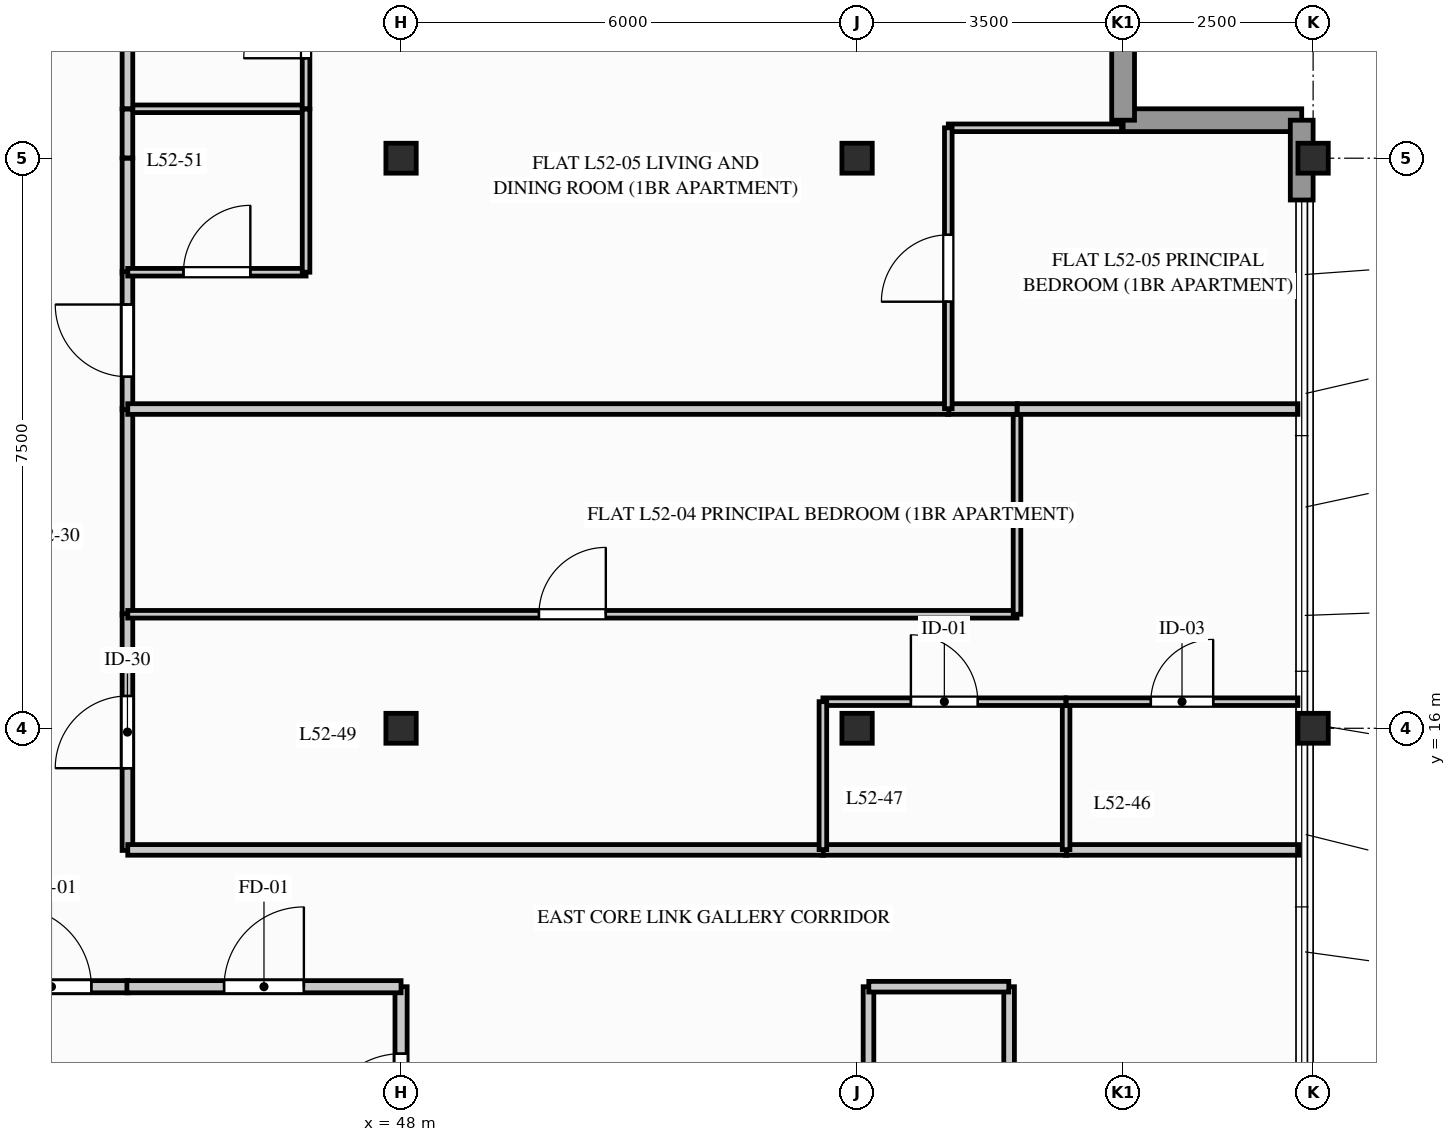
"""IFC4 building model, lengths in metres.
Left out: names, types, materials, properties, quantities, classifications, styles, units other than length and angle.
Written with IfcOpenShell. Run it as: python <this file> out.ifc"""

import sys

from ifc_helpers import new_model, si_unit, direction, frame, frame_2d, origin, origin_2d, place, context, subcontext, project, spatial, rectangle, i_section, extrude, element, fill, save


model = new_model("IFC4")
c1 = context("Model", 3, precision=1e-05, world=origin(), true_north=direction((0.0, 1.0)))
c2 = subcontext(c1, "Body", "Model", "MODEL_VIEW")
j1 = project(units=[si_unit("LENGTHUNIT", "METRE"), si_unit("PLANEANGLEUNIT", "RADIAN")], contexts=[c1])
p1 = place(None, origin())
s1 = spatial("IfcSite", under=j1, at=p1, CompositionType="ELEMENT")
p2 = place(p1, origin())
s2 = spatial("IfcBuilding", under=s1, at=p2, CompositionType="ELEMENT")
p3 = place(p2, frame((0.0, 0.0, 172.8)))
s3 = spatial("IfcBuildingStorey", under=s2, at=p3, CompositionType="ELEMENT", Elevation=172.8)
for number, where, z_axis, x_axis in (
    (1, (48.0, 16.0, 0.0), (0.0, 0.0, 1.0), (1.0, 0.0, 0.0)),
    (2, (48.0, 23.5, 0.0), (0.0, 0.0, 1.0), (1.0, 0.0, 0.0)),
    (3, (54.0, 16.0, 0.0), (0.0, 0.0, 1.0), (1.0, 0.0, 0.0)),
    (4, (54.0, 23.5, 0.0), (0.0, 0.0, 1.0), (1.0, 0.0, 0.0)),
    (5, (60.0, 16.0, 0.0), (0.0, 0.0, 1.0), (1.0, 0.0, 0.0)),
    (6, (60.0, 23.5, 0.0), (0.0, 0.0, 1.0), (1.0, 0.0, 0.0)),
):
    element("IfcColumn", number, at=place(p3, frame(where, z_axis=z_axis, x_axis=x_axis)), inside=s3, PredefinedType="COLUMN", context=c2, shape_type="SweptSolid", body=[
        extrude(i_section(OverallWidth=0.399, OverallDepth=0.394, WebThickness=0.023, FlangeThickness=0.037, FilletRadius=0.015, at=origin_2d()), origin(), (0.0, 0.0, 1.0), 3.1),
    ])
for number, where, z_axis, x_axis in (
    (7, (59.85, 24.0, 0.0), (0.0, 0.0, 1.0), (-1.0, 0.0, 0.0)),
    (8, (57.5, 24.0, 0.0), (0.0, 0.0, 1.0), (0.0, 1.0, 0.0)),
):
    element("IfcWall", number, at=place(p3, frame(where, z_axis=z_axis, x_axis=x_axis)), inside=s3, PredefinedType="STANDARD", context=c2, shape_type="SweptSolid", body=[
        extrude(rectangle(XDim=2.35, YDim=0.3, at=frame_2d((1.175, 0.0))), origin(), (0.0, 0.0, 1.0), 2.89),
    ])
p4 = place(p3, frame((59.85, 22.95, 0.0), z_axis=(0.0, 0.0, 1.0), x_axis=(0.0, 1.0, 0.0)))
e9 = element("IfcWall", 9, at=p4, inside=s3, PredefinedType="STANDARD", context=c2, shape_type="SweptSolid", body=[
    extrude(rectangle(XDim=1.05, YDim=0.3, at=frame_2d((0.525, 0.0))), origin(), (0.0, 0.0, 1.0), 2.89),
])
p5 = place(p3, frame((56.0, 7.189, 0.0), z_axis=(0.0, 0.0, 1.0), x_axis=(0.0, 1.0, 0.0)))
e10 = element("IfcWall", 10, at=p5, inside=s3, PredefinedType="PARTITIONING", context=c2, shape_type="SweptSolid", body=[
    extrude(rectangle(XDim=5.411, YDim=0.14, at=frame_2d((2.706, 0.0))), origin(), (0.0, 0.0, 1.0), 2.253),
])
p6 = place(p5, frame((2.231, 0.0, 0.0)))
e11 = element("IfcOpeningElement", 11, at=p6, cuts=e10, PredefinedType="OPENING", context=c2, shape_type="SweptSolid", body=[
    extrude(rectangle(XDim=0.95, YDim=2.05, at=frame_2d((0.475, 1.025))), frame((0.0, 0.08, 0.0), z_axis=(0.0, -1.0, 0.0), x_axis=(1.0, 0.0, 0.0)), (0.0, 0.0, 1.0), 0.16),
])
p7 = place(p3, frame((48.0, 9.789, 0.0), z_axis=(0.0, 0.0, 1.0), x_axis=(0.0, 1.0, 0.0)))
e12 = element("IfcWall", 12, at=p7, inside=s3, PredefinedType="PARTITIONING", context=c2, shape_type="SweptSolid", body=[
    extrude(rectangle(XDim=2.811, YDim=0.16, at=frame_2d((1.406, 0.0))), origin(), (0.0, 0.0, 1.0), 2.253),
])
p8 = place(p7, frame((0.881, 0.0, 0.0)))
e13 = element("IfcOpeningElement", 13, at=p8, cuts=e12, PredefinedType="OPENING", context=c2, shape_type="SweptSolid", body=[
    extrude(rectangle(XDim=1.05, YDim=2.06, at=frame_2d((0.525, 1.03))), frame((0.0, 0.09, 0.0), z_axis=(0.0, -1.0, 0.0), x_axis=(1.0, 0.0, 0.0)), (0.0, 0.0, 1.0), 0.18),
])
p9 = place(p3, frame((42.389, 12.6, 0.0), z_axis=(0.0, 0.0, 1.0), x_axis=(1.0, 0.0, 0.0)))
e14 = element("IfcWall", 14, at=p9, inside=s3, PredefinedType="PARTITIONING", context=c2, shape_type="SweptSolid", body=[
    extrude(rectangle(XDim=2.023, YDim=0.16, at=frame_2d((1.011, 0.0))), origin(), (0.0, 0.0, 1.0), 2.89),
])
p10 = place(p9, frame((0.486, 0.0, 0.0)))
e15 = element("IfcOpeningElement", 15, at=p10, cuts=e14, PredefinedType="OPENING", context=c2, shape_type="SweptSolid", body=[
    extrude(rectangle(XDim=1.05, YDim=2.06, at=frame_2d((0.525, 1.03))), frame((0.0, 0.09, 0.0), z_axis=(0.0, -1.0, 0.0), x_axis=(1.0, 0.0, 0.0)), (0.0, 0.0, 1.0), 0.18),
])
p11 = place(p3, frame((44.393, 12.6, 0.0), z_axis=(0.0, 0.0, 1.0), x_axis=(1.0, 0.0, 0.0)))
e16 = element("IfcWall", 16, at=p11, inside=s3, PredefinedType="PARTITIONING", context=c2, shape_type="SweptSolid", body=[
    extrude(rectangle(XDim=3.607, YDim=0.16, at=frame_2d((1.804, 0.0))), origin(), (0.0, 0.0, 1.0), 2.253),
])
p12 = place(p11, frame((1.279, 0.0, 0.0)))
e17 = element("IfcOpeningElement", 17, at=p12, cuts=e16, PredefinedType="OPENING", context=c2, shape_type="SweptSolid", body=[
    extrude(rectangle(XDim=1.05, YDim=2.06, at=frame_2d((0.525, 1.03))), frame((0.0, 0.09, 0.0), z_axis=(0.0, -1.0, 0.0), x_axis=(1.0, 0.0, 0.0)), (0.0, 0.0, 1.0), 0.18),
])
p13 = place(p3, frame((54.15, 9.8, 0.0), z_axis=(0.0, 0.0, 1.0), x_axis=(0.0, 1.0, 0.0)))
e18 = element("IfcWall", 18, at=p13, inside=s3, PredefinedType="PARTITIONING", context=c2, shape_type="SweptSolid", body=[
    extrude(rectangle(XDim=2.8, YDim=0.14, at=frame_2d((1.4, 0.0))), origin(), (0.0, 0.0, 1.0), 2.253),
])
p14 = place(p3, frame((54.154, 12.6, 0.0), z_axis=(0.0, 0.0, 1.0), x_axis=(1.0, 0.0, 0.0)))
e19 = element("IfcWall", 19, at=p14, inside=s3, PredefinedType="PARTITIONING", context=c2, shape_type="SweptSolid", body=[
    extrude(rectangle(XDim=1.842, YDim=0.14, at=frame_2d((0.921, 0.0))), origin(), (0.0, 0.0, 1.0), 2.89),
])
p15 = place(p3, frame((44.4, 17.489, 0.0), z_axis=(0.0, 0.0, 1.0), x_axis=(0.0, 1.0, 0.0)))
e20 = element("IfcWall", 20, at=p15, inside=s3, PredefinedType="PARTITIONING", context=c2, shape_type="SweptSolid", body=[
    extrude(rectangle(XDim=2.722, YDim=0.14, at=frame_2d((1.361, 0.0))), origin(), (0.0, 0.0, 1.0), 2.562),
])
p16 = place(p3, frame((44.4, 14.393, 0.0), z_axis=(0.0, 0.0, 1.0), x_axis=(0.0, 1.0, 0.0)))
e21 = element("IfcWall", 21, at=p16, inside=s3, PredefinedType="PARTITIONING", context=c2, shape_type="SweptSolid", body=[
    extrude(rectangle(XDim=3.115, YDim=0.14, at=frame_2d((1.557, 0.0))), origin(), (0.0, 0.0, 1.0), 2.253),
])
p17 = place(p16, frame((1.082, 0.0, 0.0)))
e22 = element("IfcOpeningElement", 22, at=p17, cuts=e21, PredefinedType="OPENING", context=c2, shape_type="SweptSolid", body=[
    extrude(rectangle(XDim=0.95, YDim=2.05, at=frame_2d((0.475, 1.025))), frame((0.0, 0.08, 0.0), z_axis=(0.0, -1.0, 0.0), x_axis=(1.0, 0.0, 0.0)), (0.0, 0.0, 1.0), 0.16),
])
p18 = place(p3, frame((44.4, 21.989, 0.0), z_axis=(0.0, 0.0, 1.0), x_axis=(0.0, 1.0, 0.0)))
e23 = element("IfcWall", 23, at=p18, inside=s3, PredefinedType="PARTITIONING", context=c2, shape_type="SweptSolid", body=[
    extrude(rectangle(XDim=1.511, YDim=0.14, at=frame_2d((0.756, 0.0))), origin(), (0.0, 0.0, 1.0), 2.253),
])
p19 = place(p3, frame((44.4, 20.193, 0.0), z_axis=(0.0, 0.0, 1.0), x_axis=(0.0, 1.0, 0.0)))
e24 = element("IfcWall", 24, at=p19, inside=s3, PredefinedType="PARTITIONING", context=c2, shape_type="SweptSolid", body=[
    extrude(rectangle(XDim=1.815, YDim=0.14, at=frame_2d((0.907, 0.0))), origin(), (0.0, 0.0, 1.0), 2.89),
])
p20 = place(p19, frame((0.432, 0.0, 0.0)))
e25 = element("IfcOpeningElement", 25, at=p20, cuts=e24, PredefinedType="OPENING", context=c2, shape_type="SweptSolid", body=[
    extrude(rectangle(XDim=0.95, YDim=2.05, at=frame_2d((0.475, 1.025))), frame((0.0, 0.08, 0.0), z_axis=(0.0, -1.0, 0.0), x_axis=(1.0, 0.0, 0.0)), (0.0, 0.0, 1.0), 0.16),
])
p21 = place(p3, frame((56.739, 14.4, 0.0), z_axis=(0.0, 0.0, 1.0), x_axis=(1.0, 0.0, 0.0)))
e26 = element("IfcWall", 26, at=p21, inside=s3, PredefinedType="PARTITIONING", context=c2, shape_type="SweptSolid", body=[
    extrude(rectangle(XDim=3.073, YDim=0.14, at=frame_2d((1.536, 0.0))), origin(), (0.0, 0.0, 1.0), 2.89),
])
p22 = place(p3, frame((53.539, 14.4, 0.0), z_axis=(0.0, 0.0, 1.0), x_axis=(1.0, 0.0, 0.0)))
e27 = element("IfcWall", 27, at=p22, inside=s3, PredefinedType="PARTITIONING", context=c2, shape_type="SweptSolid", body=[
    extrude(rectangle(XDim=3.219, YDim=0.14, at=frame_2d((1.609, 0.0))), origin(), (0.0, 0.0, 1.0), 2.253),
])
p23 = place(p3, frame((44.404, 14.4, 0.0), z_axis=(0.0, 0.0, 1.0), x_axis=(1.0, 0.0, 0.0)))
e28 = element("IfcWall", 28, at=p23, inside=s3, PredefinedType="PARTITIONING", context=c2, shape_type="SweptSolid", body=[
    extrude(rectangle(XDim=9.153, YDim=0.14, at=frame_2d((4.577, 0.0))), origin(), (0.0, 0.0, 1.0), 2.253),
])
p24 = place(p3, frame((56.75, 14.404, 0.0), z_axis=(0.0, 0.0, 1.0), x_axis=(0.0, 1.0, 0.0)))
e29 = element("IfcWall", 29, at=p24, inside=s3, PredefinedType="PARTITIONING", context=c2, shape_type="SweptSolid", body=[
    extrude(rectangle(XDim=1.946, YDim=0.1, at=frame_2d((0.973, 0.0))), origin(), (0.0, 0.0, 1.0), 2.253),
])
p25 = place(p3, frame((56.75, 16.35, 0.0), z_axis=(0.0, 0.0, 1.0), x_axis=(1.0, 0.0, 0.0)))
e30 = element("IfcWall", 30, at=p25, inside=s3, PredefinedType="PARTITIONING", context=c2, shape_type="SweptSolid", body=[
    extrude(rectangle(XDim=3.05, YDim=0.1, at=frame_2d((1.525, 0.0))), origin(), (0.0, 0.0, 1.0), 2.89),
])
p26 = place(p25, frame((1.115, 0.0, 0.0)))
e31 = element("IfcOpeningElement", 31, at=p26, cuts=e30, PredefinedType="OPENING", context=c2, shape_type="SweptSolid", body=[
    extrude(rectangle(XDim=0.82, YDim=2.02, at=frame_2d((0.41, 1.01))), frame((0.0, 0.06, 0.0), z_axis=(0.0, -1.0, 0.0), x_axis=(1.0, 0.0, 0.0)), (0.0, 0.0, 1.0), 0.12),
])
p27 = place(p3, frame((53.55, 16.35, 0.0), z_axis=(0.0, 0.0, 1.0), x_axis=(1.0, 0.0, 0.0)))
e32 = element("IfcWall", 32, at=p27, inside=s3, PredefinedType="PARTITIONING", context=c2, shape_type="SweptSolid", body=[
    extrude(rectangle(XDim=3.196, YDim=0.1, at=frame_2d((1.598, 0.0))), origin(), (0.0, 0.0, 1.0), 2.253),
])
p28 = place(p27, frame((1.158, 0.0, 0.0)))
e33 = element("IfcOpeningElement", 33, at=p28, cuts=e32, PredefinedType="OPENING", context=c2, shape_type="SweptSolid", body=[
    extrude(rectangle(XDim=0.88, YDim=2.04, at=frame_2d((0.44, 1.02))), frame((0.0, 0.06, 0.0), z_axis=(0.0, -1.0, 0.0), x_axis=(1.0, 0.0, 0.0)), (0.0, 0.0, 1.0), 0.12),
])
p29 = place(p3, frame((53.55, 14.404, 0.0), z_axis=(0.0, 0.0, 1.0), x_axis=(0.0, 1.0, 0.0)))
e34 = element("IfcWall", 34, at=p29, inside=s3, PredefinedType="PARTITIONING", context=c2, shape_type="SweptSolid", body=[
    extrude(rectangle(XDim=1.946, YDim=0.1, at=frame_2d((0.973, 0.0))), origin(), (0.0, 0.0, 1.0), 2.253),
])
p30 = place(p3, frame((44.404, 17.5, 0.0), z_axis=(0.0, 0.0, 1.0), x_axis=(1.0, 0.0, 0.0)))
e35 = element("IfcWall", 35, at=p30, inside=s3, PredefinedType="PARTITIONING", context=c2, shape_type="SweptSolid", body=[
    extrude(rectangle(XDim=11.7, YDim=0.1, at=frame_2d((5.85, 0.0))), origin(), (0.0, 0.0, 1.0), 2.253),
])
p31 = place(p30, frame((5.41, 0.0, 0.0)))
e36 = element("IfcOpeningElement", 36, at=p31, cuts=e35, PredefinedType="OPENING", context=c2, shape_type="SweptSolid", body=[
    extrude(rectangle(XDim=0.88, YDim=2.04, at=frame_2d((0.44, 1.02))), frame((0.0, 0.06, 0.0), z_axis=(0.0, -1.0, 0.0), x_axis=(1.0, 0.0, 0.0)), (0.0, 0.0, 1.0), 0.12),
])
p32 = place(p3, frame((56.104, 17.5, 0.0), z_axis=(0.0, 0.0, 1.0), x_axis=(0.0, 1.0, 0.0)))
e37 = element("IfcWall", 37, at=p32, inside=s3, PredefinedType="PARTITIONING", context=c2, shape_type="SweptSolid", body=[
    extrude(rectangle(XDim=2.7, YDim=0.1, at=frame_2d((1.35, 0.0))), origin(), (0.0, 0.0, 1.0), 2.562),
])
p33 = place(p3, frame((55.189, 20.2, 0.0), z_axis=(0.0, 0.0, 1.0), x_axis=(1.0, 0.0, 0.0)))
e38 = element("IfcWall", 38, at=p33, inside=s3, PredefinedType="PARTITIONING", context=c2, shape_type="SweptSolid", body=[
    extrude(rectangle(XDim=0.915, YDim=0.14, at=frame_2d((0.458, 0.0))), origin(), (0.0, 0.0, 1.0), 2.89),
])
p34 = place(p3, frame((44.404, 20.2, 0.0), z_axis=(0.0, 0.0, 1.0), x_axis=(1.0, 0.0, 0.0)))
e39 = element("IfcWall", 39, at=p34, inside=s3, PredefinedType="PARTITIONING", context=c2, shape_type="SweptSolid", body=[
    extrude(rectangle(XDim=10.803, YDim=0.14, at=frame_2d((5.402, 0.0))), origin(), (0.0, 0.0, 1.0), 2.253),
])
p35 = place(p3, frame((56.108, 20.2, 0.0), z_axis=(0.0, 0.0, 1.0), x_axis=(1.0, 0.0, 0.0)))
e40 = element("IfcWall", 40, at=p35, inside=s3, PredefinedType="PARTITIONING", context=c2, shape_type="SweptSolid", body=[
    extrude(rectangle(XDim=3.692, YDim=0.14, at=frame_2d((1.846, 0.0))), origin(), (0.0, 0.0, 1.0), 2.89),
])
p36 = place(p3, frame((44.4, 24.15, 0.0), z_axis=(0.0, 0.0, 1.0), x_axis=(1.0, 0.0, 0.0)))
e41 = element("IfcWall", 41, at=p36, inside=s3, PredefinedType="PARTITIONING", context=c2, shape_type="SweptSolid", body=[
    extrude(rectangle(XDim=2.35, YDim=0.1, at=frame_2d((1.175, 0.0))), origin(), (0.0, 0.0, 1.0), 2.89),
])
p37 = place(p3, frame((46.75, 24.15, 0.0), z_axis=(0.0, 0.0, 1.0), x_axis=(0.0, 1.0, 0.0)))
e42 = element("IfcWall", 42, at=p37, inside=s3, PredefinedType="PARTITIONING", context=c2, shape_type="SweptSolid", body=[
    extrude(rectangle(XDim=2.15, YDim=0.1, at=frame_2d((1.075, 0.0))), origin(), (0.0, 0.0, 1.0), 2.89),
])
p38 = place(p37, frame((0.665, 0.0, 0.0)))
e43 = element("IfcOpeningElement", 43, at=p38, cuts=e42, PredefinedType="OPENING", context=c2, shape_type="SweptSolid", body=[
    extrude(rectangle(XDim=0.82, YDim=2.02, at=frame_2d((0.41, 1.01))), frame((0.0, 0.06, 0.0), z_axis=(0.0, -1.0, 0.0), x_axis=(1.0, 0.0, 0.0)), (0.0, 0.0, 1.0), 0.12),
])
p39 = place(p3, frame((44.4, 24.15, 0.0), z_axis=(0.0, 0.0, 1.0), x_axis=(0.0, 1.0, 0.0)))
e44 = element("IfcWall", 44, at=p39, inside=s3, PredefinedType="PARTITIONING", context=c2, shape_type="SweptSolid", body=[
    extrude(rectangle(XDim=0.961, YDim=0.14, at=frame_2d((0.481, 0.0))), origin(), (0.0, 0.0, 1.0), 2.89),
])
p40 = place(p3, frame((44.404, 22.0, 0.0), z_axis=(0.0, 0.0, 1.0), x_axis=(1.0, 0.0, 0.0)))
e45 = element("IfcWall", 45, at=p40, inside=s3, PredefinedType="PARTITIONING", context=c2, shape_type="SweptSolid", body=[
    extrude(rectangle(XDim=2.346, YDim=0.1, at=frame_2d((1.173, 0.0))), origin(), (0.0, 0.0, 1.0), 2.89),
])
p41 = place(p40, frame((0.733, 0.0, 0.0)))
e46 = element("IfcOpeningElement", 46, at=p41, cuts=e45, PredefinedType="OPENING", context=c2, shape_type="SweptSolid", body=[
    extrude(rectangle(XDim=0.88, YDim=2.04, at=frame_2d((0.44, 1.02))), frame((0.0, 0.06, 0.0), z_axis=(0.0, -1.0, 0.0), x_axis=(1.0, 0.0, 0.0)), (0.0, 0.0, 1.0), 0.12),
])
p42 = place(p3, frame((46.75, 22.0, 0.0), z_axis=(0.0, 0.0, 1.0), x_axis=(0.0, 1.0, 0.0)))
e47 = element("IfcWall", 47, at=p42, inside=s3, PredefinedType="PARTITIONING", context=c2, shape_type="SweptSolid", body=[
    extrude(rectangle(XDim=2.146, YDim=0.1, at=frame_2d((1.073, 0.0))), origin(), (0.0, 0.0, 1.0), 2.253),
])
p43 = place(p3, frame((44.4, 23.504, 0.0), z_axis=(0.0, 0.0, 1.0), x_axis=(0.0, 1.0, 0.0)))
e48 = element("IfcWall", 48, at=p43, inside=s3, PredefinedType="PARTITIONING", context=c2, shape_type="SweptSolid", body=[
    extrude(rectangle(XDim=0.642, YDim=0.14, at=frame_2d((0.321, 0.0))), origin(), (0.0, 0.0, 1.0), 2.253),
])
p44 = place(p3, frame((55.2, 23.9, 0.0), z_axis=(0.0, 0.0, 1.0), x_axis=(1.0, 0.0, 0.0)))
e49 = element("IfcWall", 49, at=p44, inside=s3, PredefinedType="PARTITIONING", context=c2, shape_type="SweptSolid", body=[
    extrude(rectangle(XDim=2.28, YDim=0.1, at=frame_2d((1.14, 0.0))), origin(), (0.0, 0.0, 1.0), 2.89),
])
p45 = place(p3, frame((55.2, 20.204, 0.0), z_axis=(0.0, 0.0, 1.0), x_axis=(0.0, 1.0, 0.0)))
e50 = element("IfcWall", 50, at=p45, inside=s3, PredefinedType="PARTITIONING", context=c2, shape_type="SweptSolid", body=[
    extrude(rectangle(XDim=3.696, YDim=0.1, at=frame_2d((1.848, 0.0))), origin(), (0.0, 0.0, 1.0), 2.253),
])
p46 = place(p45, frame((1.408, 0.0, 0.0)))
e51 = element("IfcOpeningElement", 51, at=p46, cuts=e50, PredefinedType="OPENING", context=c2, shape_type="SweptSolid", body=[
    extrude(rectangle(XDim=0.88, YDim=2.04, at=frame_2d((0.44, 1.02))), frame((0.0, 0.06, 0.0), z_axis=(0.0, -1.0, 0.0), x_axis=(1.0, 0.0, 0.0)), (0.0, 0.0, 1.0), 0.12),
])
p47 = place(p8, origin())
e52 = element("IfcDoor", 52, at=p47, inside=s3, OperationType="SINGLE_SWING_LEFT", PredefinedType="DOOR", context=c2, shape_type="SweptSolid", body=[
    extrude(rectangle(XDim=1.05, YDim=2.06, at=frame_2d((0.525, 1.03))), frame((0.0, 0.025, 0.0), z_axis=(0.0, -1.0, 0.0), x_axis=(1.0, 0.0, 0.0)), (0.0, 0.0, 1.0), 0.05),
])
fill(e13, e52)
p48 = place(p10, origin())
e53 = element("IfcDoor", 53, at=p48, inside=s3, OperationType="SINGLE_SWING_LEFT", PredefinedType="DOOR", context=c2, shape_type="SweptSolid", body=[
    extrude(rectangle(XDim=1.05, YDim=2.06, at=frame_2d((0.525, 1.03))), frame((0.0, 0.025, 0.0), z_axis=(0.0, -1.0, 0.0), x_axis=(1.0, 0.0, 0.0)), (0.0, 0.0, 1.0), 0.05),
])
fill(e15, e53)
p49 = place(p12, origin())
e54 = element("IfcDoor", 54, at=p49, inside=s3, OperationType="SINGLE_SWING_RIGHT", PredefinedType="DOOR", context=c2, shape_type="SweptSolid", body=[
    extrude(rectangle(XDim=1.05, YDim=2.06, at=frame_2d((0.525, 1.03))), frame((0.0, 0.025, 0.0), z_axis=(0.0, -1.0, 0.0), x_axis=(1.0, 0.0, 0.0)), (0.0, 0.0, 1.0), 0.05),
])
fill(e17, e54)
p50 = place(p17, origin())
e55 = element("IfcDoor", 55, at=p50, inside=s3, OperationType="SINGLE_SWING_LEFT", PredefinedType="DOOR", context=c2, shape_type="SweptSolid", body=[
    extrude(rectangle(XDim=0.95, YDim=2.05, at=frame_2d((0.475, 1.025))), frame((0.0, 0.025, 0.0), z_axis=(0.0, -1.0, 0.0), x_axis=(1.0, 0.0, 0.0)), (0.0, 0.0, 1.0), 0.05),
])
fill(e22, e55)
p51 = place(p20, origin())
e56 = element("IfcDoor", 56, at=p51, inside=s3, OperationType="SINGLE_SWING_RIGHT", PredefinedType="DOOR", context=c2, shape_type="SweptSolid", body=[
    extrude(rectangle(XDim=0.95, YDim=2.05, at=frame_2d((0.475, 1.025))), frame((0.0, 0.025, 0.0), z_axis=(0.0, -1.0, 0.0), x_axis=(1.0, 0.0, 0.0)), (0.0, 0.0, 1.0), 0.05),
])
fill(e25, e56)
p52 = place(p26, origin())
e57 = element("IfcDoor", 57, at=p52, inside=s3, OperationType="SINGLE_SWING_RIGHT", PredefinedType="DOOR", context=c2, shape_type="SweptSolid", body=[
    extrude(rectangle(XDim=0.82, YDim=2.02, at=frame_2d((0.41, 1.01))), frame((0.0, 0.025, 0.0), z_axis=(0.0, -1.0, 0.0), x_axis=(1.0, 0.0, 0.0)), (0.0, 0.0, 1.0), 0.05),
])
fill(e31, e57)
p53 = place(p28, origin())
e58 = element("IfcDoor", 58, at=p53, inside=s3, OperationType="SINGLE_SWING_LEFT", PredefinedType="DOOR", context=c2, shape_type="SweptSolid", body=[
    extrude(rectangle(XDim=0.88, YDim=2.04, at=frame_2d((0.44, 1.02))), frame((0.0, 0.025, 0.0), z_axis=(0.0, -1.0, 0.0), x_axis=(1.0, 0.0, 0.0)), (0.0, 0.0, 1.0), 0.05),
])
fill(e33, e58)
p54 = place(p31, origin())
e59 = element("IfcDoor", 59, at=p54, inside=s3, OperationType="SINGLE_SWING_RIGHT", PredefinedType="DOOR", context=c2, shape_type="SweptSolid", body=[
    extrude(rectangle(XDim=0.88, YDim=2.04, at=frame_2d((0.44, 1.02))), frame((0.0, 0.025, 0.0), z_axis=(0.0, -1.0, 0.0), x_axis=(1.0, 0.0, 0.0)), (0.0, 0.0, 1.0), 0.05),
])
fill(e36, e59)
p55 = place(p38, origin())
e60 = element("IfcDoor", 60, at=p55, inside=s3, OperationType="SINGLE_SWING_LEFT", PredefinedType="DOOR", context=c2, shape_type="SweptSolid", body=[
    extrude(rectangle(XDim=0.82, YDim=2.02, at=frame_2d((0.41, 1.01))), frame((0.0, 0.025, 0.0), z_axis=(0.0, -1.0, 0.0), x_axis=(1.0, 0.0, 0.0)), (0.0, 0.0, 1.0), 0.05),
])
fill(e43, e60)
p56 = place(p41, origin())
e61 = element("IfcDoor", 61, at=p56, inside=s3, OperationType="SINGLE_SWING_RIGHT", PredefinedType="DOOR", context=c2, shape_type="SweptSolid", body=[
    extrude(rectangle(XDim=0.88, YDim=2.04, at=frame_2d((0.44, 1.02))), frame((0.0, 0.025, 0.0), z_axis=(0.0, -1.0, 0.0), x_axis=(1.0, 0.0, 0.0)), (0.0, 0.0, 1.0), 0.05),
])
fill(e46, e61)
p57 = place(p46, origin())
e62 = element("IfcDoor", 62, at=p57, inside=s3, OperationType="SINGLE_SWING_LEFT", PredefinedType="DOOR", context=c2, shape_type="SweptSolid", body=[
    extrude(rectangle(XDim=0.88, YDim=2.04, at=frame_2d((0.44, 1.02))), frame((0.0, 0.025, 0.0), z_axis=(0.0, -1.0, 0.0), x_axis=(1.0, 0.0, 0.0)), (0.0, 0.0, 1.0), 0.05),
])
fill(e51, e62)
save(model, sys.argv[1])
